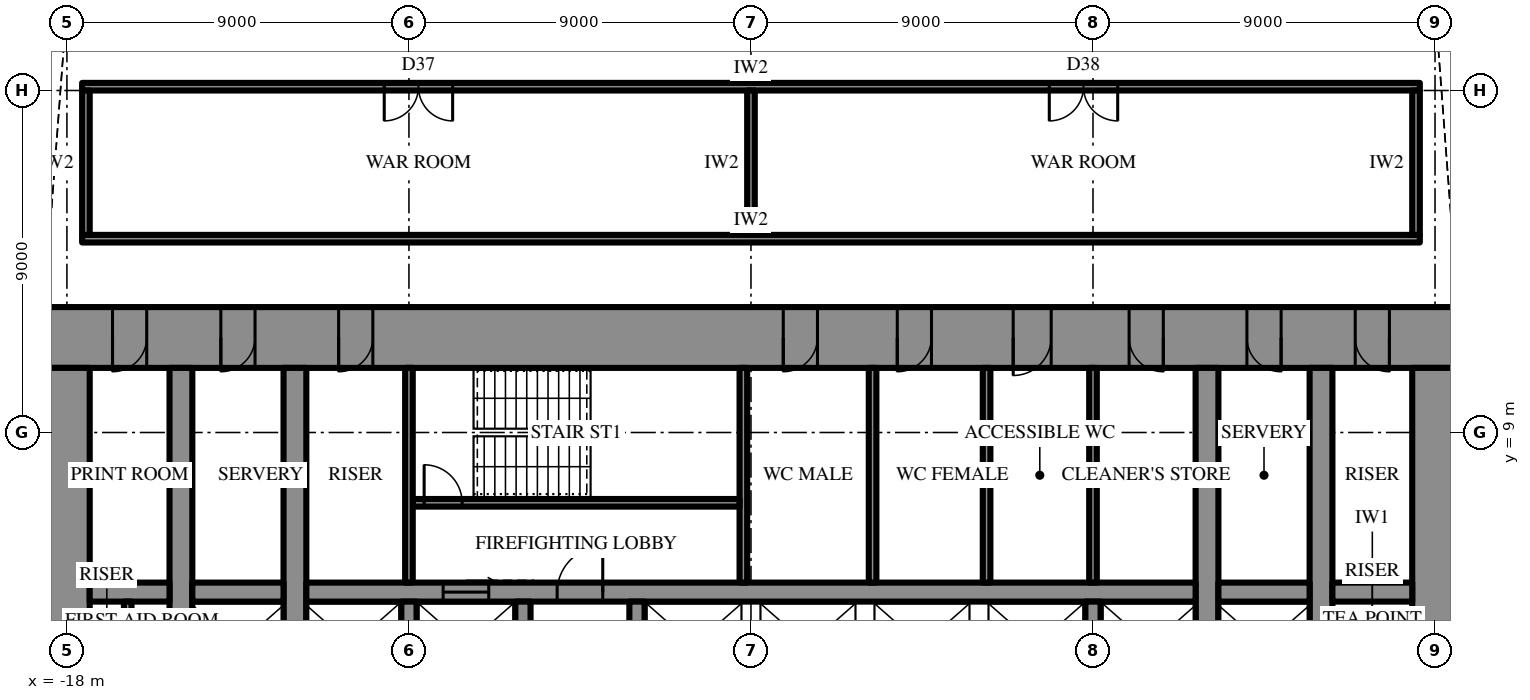
"""IFC4 building model, lengths in metres.
Left out: names, types, materials, properties, quantities, classifications, styles, units other than length and angle.
Written with IfcOpenShell. Run it as: python <this file> out.ifc"""

import sys

from ifc_helpers import new_model, si_unit, direction, frame, frame_2d, origin, place, context, subcontext, project, spatial, rectangle, extrude, element, fill, save


model = new_model("IFC4")
c1 = context("Model", 3, precision=1e-05, world=origin(), true_north=direction((0.0, 1.0)))
c2 = subcontext(c1, "Body", "Model", "MODEL_VIEW")
j1 = project(units=[si_unit("LENGTHUNIT", "METRE"), si_unit("PLANEANGLEUNIT", "RADIAN")], contexts=[c1])
p1 = place(None, origin())
s1 = spatial("IfcSite", under=j1, at=p1, CompositionType="ELEMENT")
p2 = place(p1, origin())
s2 = spatial("IfcBuilding", under=s1, at=p2, CompositionType="ELEMENT")
p3 = place(p2, frame((0.0, 0.0, 153.1)))
s3 = spatial("IfcBuildingStorey", under=s2, at=p3, CompositionType="ELEMENT", Elevation=153.1)
p4 = place(p3, frame((-18.6, 11.5, 0.0), z_axis=(0.0, 0.0, 1.0), x_axis=(1.0, 0.0, 0.0)))
e1 = element("IfcWall", 1, at=p4, inside=s3, PredefinedType="SHEAR", context=c2, shape_type="SweptSolid", body=[
    extrude(rectangle(XDim=37.2, YDim=1.6, at=frame_2d((18.6, 0.0))), origin(), (0.0, 0.0, 1.0), 4.2),
])
p5 = place(p4, frame((19.45, 0.0, 0.0)))
e2 = element("IfcOpeningElement", 2, at=p5, cuts=e1, PredefinedType="OPENING", context=c2, shape_type="SweptSolid", body=[
    extrude(rectangle(XDim=0.9, YDim=2.2, at=frame_2d((0.45, 1.1))), frame((0.0, 0.81, 0.0), z_axis=(0.0, -1.0, 0.0), x_axis=(1.0, 0.0, 0.0)), (0.0, 0.0, 1.0), 1.62),
])
p6 = place(p4, frame((22.45, 0.0, 0.0)))
e3 = element("IfcOpeningElement", 3, at=p6, cuts=e1, PredefinedType="OPENING", context=c2, shape_type="SweptSolid", body=[
    extrude(rectangle(XDim=0.9, YDim=2.2, at=frame_2d((0.45, 1.1))), frame((0.0, 0.81, 0.0), z_axis=(0.0, -1.0, 0.0), x_axis=(1.0, 0.0, 0.0)), (0.0, 0.0, 1.0), 1.62),
])
p7 = place(p4, frame((25.5, 0.0, 0.0)))
e4 = element("IfcOpeningElement", 4, at=p7, cuts=e1, PredefinedType="OPENING", context=c2, shape_type="SweptSolid", body=[
    extrude(rectangle(XDim=1.0, YDim=2.2, at=frame_2d((0.5, 1.1))), frame((0.0, 0.81, 0.0), z_axis=(0.0, -1.0, 0.0), x_axis=(1.0, 0.0, 0.0)), (0.0, 0.0, 1.0), 1.62),
])
p8 = place(p4, frame((1.8, 0.0, 0.0)))
e5 = element("IfcOpeningElement", 5, at=p8, cuts=e1, PredefinedType="OPENING", context=c2, shape_type="SweptSolid", body=[
    extrude(rectangle(XDim=0.9, YDim=2.2, at=frame_2d((0.45, 1.1))), frame((0.0, 0.81, 0.0), z_axis=(0.0, -1.0, 0.0), x_axis=(1.0, 0.0, 0.0)), (0.0, 0.0, 1.0), 1.62),
])
p9 = place(p4, frame((4.65, 0.0, 0.0)))
e6 = element("IfcOpeningElement", 6, at=p9, cuts=e1, PredefinedType="OPENING", context=c2, shape_type="SweptSolid", body=[
    extrude(rectangle(XDim=0.9, YDim=2.2, at=frame_2d((0.45, 1.1))), frame((0.0, 0.81, 0.0), z_axis=(0.0, -1.0, 0.0), x_axis=(1.0, 0.0, 0.0)), (0.0, 0.0, 1.0), 1.62),
])
p10 = place(p4, frame((7.75, 0.0, 0.0)))
e7 = element("IfcOpeningElement", 7, at=p10, cuts=e1, PredefinedType="OPENING", context=c2, shape_type="SweptSolid", body=[
    extrude(rectangle(XDim=0.9, YDim=2.2, at=frame_2d((0.45, 1.1))), frame((0.0, 0.81, 0.0), z_axis=(0.0, -1.0, 0.0), x_axis=(1.0, 0.0, 0.0)), (0.0, 0.0, 1.0), 1.62),
])
p11 = place(p4, frame((28.55, 0.0, 0.0)))
e8 = element("IfcOpeningElement", 8, at=p11, cuts=e1, PredefinedType="OPENING", context=c2, shape_type="SweptSolid", body=[
    extrude(rectangle(XDim=0.9, YDim=2.2, at=frame_2d((0.45, 1.1))), frame((0.0, 0.81, 0.0), z_axis=(0.0, -1.0, 0.0), x_axis=(1.0, 0.0, 0.0)), (0.0, 0.0, 1.0), 1.62),
])
p12 = place(p4, frame((31.65, 0.0, 0.0)))
e9 = element("IfcOpeningElement", 9, at=p12, cuts=e1, PredefinedType="OPENING", context=c2, shape_type="SweptSolid", body=[
    extrude(rectangle(XDim=0.9, YDim=2.2, at=frame_2d((0.45, 1.1))), frame((0.0, 0.81, 0.0), z_axis=(0.0, -1.0, 0.0), x_axis=(1.0, 0.0, 0.0)), (0.0, 0.0, 1.0), 1.62),
])
p13 = place(p4, frame((34.5, 0.0, 0.0)))
e10 = element("IfcOpeningElement", 10, at=p13, cuts=e1, PredefinedType="OPENING", context=c2, shape_type="SweptSolid", body=[
    extrude(rectangle(XDim=0.9, YDim=2.2, at=frame_2d((0.45, 1.1))), frame((0.0, 0.81, 0.0), z_axis=(0.0, -1.0, 0.0), x_axis=(1.0, 0.0, 0.0)), (0.0, 0.0, 1.0), 1.62),
])
p14 = place(p3, frame((18.0, -10.7, 0.0), z_axis=(0.0, 0.0, 1.0), x_axis=(0.0, 1.0, 0.0)))
e11 = element("IfcWall", 11, at=p14, inside=s3, PredefinedType="SHEAR", context=c2, shape_type="SweptSolid", body=[
    extrude(rectangle(XDim=21.4, YDim=1.2, at=frame_2d((10.7, 0.0))), origin(), (0.0, 0.0, 1.0), 4.2),
])
p15 = place(p14, frame((9.8, 0.0, 0.0)))
e12 = element("IfcOpeningElement", 12, at=p15, cuts=e11, PredefinedType="OPENING", context=c2, shape_type="SweptSolid", body=[
    extrude(rectangle(XDim=1.8, YDim=2.4, at=frame_2d((0.9, 1.2))), frame((0.0, 0.61, 0.0), z_axis=(0.0, -1.0, 0.0), x_axis=(1.0, 0.0, 0.0)), (0.0, 0.0, 1.0), 1.22),
])
p16 = place(p3, frame((-18.0, 10.7, 0.0), z_axis=(0.0, 0.0, 1.0), x_axis=(0.0, -1.0, 0.0)))
e13 = element("IfcWall", 13, at=p16, inside=s3, PredefinedType="SHEAR", context=c2, shape_type="SweptSolid", body=[
    extrude(rectangle(XDim=21.4, YDim=1.2, at=frame_2d((10.7, 0.0))), origin(), (0.0, 0.0, 1.0), 4.2),
])
p17 = place(p16, frame((9.8, 0.0, 0.0)))
e14 = element("IfcOpeningElement", 14, at=p17, cuts=e13, PredefinedType="OPENING", context=c2, shape_type="SweptSolid", body=[
    extrude(rectangle(XDim=1.8, YDim=2.4, at=frame_2d((0.9, 1.2))), frame((0.0, 0.61, 0.0), z_axis=(0.0, -1.0, 0.0), x_axis=(1.0, 0.0, 0.0)), (0.0, 0.0, 1.0), 1.22),
])
p18 = place(p3, frame((12.0, -10.7, 0.0), z_axis=(0.0, 0.0, 1.0), x_axis=(0.0, 1.0, 0.0)))
e15 = element("IfcWall", 15, at=p18, inside=s3, PredefinedType="SHEAR", context=c2, shape_type="SweptSolid", body=[
    extrude(rectangle(XDim=21.4, YDim=0.6, at=frame_2d((10.7, 0.0))), origin(), (0.0, 0.0, 1.0), 4.2),
])
p19 = place(p18, frame((9.8, 0.0, 0.0)))
e16 = element("IfcOpeningElement", 16, at=p19, cuts=e15, PredefinedType="OPENING", context=c2, shape_type="SweptSolid", body=[
    extrude(rectangle(XDim=1.8, YDim=2.4, at=frame_2d((0.9, 1.2))), frame((0.0, 0.31, 0.0), z_axis=(0.0, -1.0, 0.0), x_axis=(1.0, 0.0, 0.0)), (0.0, 0.0, 1.0), 0.62),
])
p20 = place(p3, frame((-12.0, -10.7, 0.0), z_axis=(0.0, 0.0, 1.0), x_axis=(0.0, 1.0, 0.0)))
e17 = element("IfcWall", 17, at=p20, inside=s3, PredefinedType="SHEAR", context=c2, shape_type="SweptSolid", body=[
    extrude(rectangle(XDim=21.4, YDim=0.6, at=frame_2d((10.7, 0.0))), origin(), (0.0, 0.0, 1.0), 4.2),
])
p21 = place(p20, frame((9.8, 0.0, 0.0)))
e18 = element("IfcOpeningElement", 18, at=p21, cuts=e17, PredefinedType="OPENING", context=c2, shape_type="SweptSolid", body=[
    extrude(rectangle(XDim=1.8, YDim=2.4, at=frame_2d((0.9, 1.2))), frame((0.0, 0.31, 0.0), z_axis=(0.0, -1.0, 0.0), x_axis=(1.0, 0.0, 0.0)), (0.0, 0.0, 1.0), 0.62),
])
p22 = place(p3, frame((15.0, -10.7, 0.0), z_axis=(0.0, 0.0, 1.0), x_axis=(0.0, 1.0, 0.0)))
e19 = element("IfcWall", 19, at=p22, inside=s3, PredefinedType="SHEAR", context=c2, shape_type="SweptSolid", body=[
    extrude(rectangle(XDim=21.4, YDim=0.6, at=frame_2d((10.7, 0.0))), origin(), (0.0, 0.0, 1.0), 4.2),
])
p23 = place(p22, frame((9.8, 0.0, 0.0)))
e20 = element("IfcOpeningElement", 20, at=p23, cuts=e19, PredefinedType="OPENING", context=c2, shape_type="SweptSolid", body=[
    extrude(rectangle(XDim=1.8, YDim=2.4, at=frame_2d((0.9, 1.2))), frame((0.0, 0.31, 0.0), z_axis=(0.0, -1.0, 0.0), x_axis=(1.0, 0.0, 0.0)), (0.0, 0.0, 1.0), 0.62),
])
p24 = place(p3, frame((-15.0, -10.7, 0.0), z_axis=(0.0, 0.0, 1.0), x_axis=(0.0, 1.0, 0.0)))
e21 = element("IfcWall", 21, at=p24, inside=s3, PredefinedType="SHEAR", context=c2, shape_type="SweptSolid", body=[
    extrude(rectangle(XDim=21.4, YDim=0.6, at=frame_2d((10.7, 0.0))), origin(), (0.0, 0.0, 1.0), 4.2),
])
p25 = place(p24, frame((9.8, 0.0, 0.0)))
e22 = element("IfcOpeningElement", 22, at=p25, cuts=e21, PredefinedType="OPENING", context=c2, shape_type="SweptSolid", body=[
    extrude(rectangle(XDim=1.8, YDim=2.4, at=frame_2d((0.9, 1.2))), frame((0.0, 0.31, 0.0), z_axis=(0.0, -1.0, 0.0), x_axis=(1.0, 0.0, 0.0)), (0.0, 0.0, 1.0), 0.62),
])
p26 = place(p3, frame((-17.4, 4.8, 0.0), z_axis=(0.0, 0.0, 1.0), x_axis=(1.0, 0.0, 0.0)))
e23 = element("IfcWall", 23, at=p26, inside=s3, PredefinedType="SHEAR", context=c2, shape_type="SweptSolid", body=[
    extrude(rectangle(XDim=2.1, YDim=0.5, at=frame_2d((1.05, 0.0))), origin(), (0.0, 0.0, 1.0), 4.2),
])
p27 = place(p3, frame((-14.7, 4.8, 0.0), z_axis=(0.0, 0.0, 1.0), x_axis=(1.0, 0.0, 0.0)))
e24 = element("IfcWall", 24, at=p27, inside=s3, PredefinedType="SHEAR", context=c2, shape_type="SweptSolid", body=[
    extrude(rectangle(XDim=2.4, YDim=0.5, at=frame_2d((1.2, 0.0))), origin(), (0.0, 0.0, 1.0), 4.2),
])
p28 = place(p3, frame((-11.7, 4.8, 0.0), z_axis=(0.0, 0.0, 1.0), x_axis=(1.0, 0.0, 0.0)))
e25 = element("IfcWall", 25, at=p28, inside=s3, PredefinedType="SHEAR", context=c2, shape_type="SweptSolid", body=[
    extrude(rectangle(XDim=23.4, YDim=0.5, at=frame_2d((11.7, 0.0))), origin(), (0.0, 0.0, 1.0), 4.2),
])
p29 = place(p28, frame((6.6, 0.0, 0.0)))
e26 = element("IfcOpeningElement", 26, at=p29, cuts=e25, PredefinedType="OPENING", context=c2, shape_type="SweptSolid", body=[
    extrude(rectangle(XDim=1.2, YDim=2.2, at=frame_2d((0.6, 1.1))), frame((0.0, 0.26, 0.0), z_axis=(0.0, -1.0, 0.0), x_axis=(1.0, 0.0, 0.0)), (0.0, 0.0, 1.0), 0.52),
])
p30 = place(p28, frame((3.6, 0.0, 0.0)))
e27 = element("IfcOpeningElement", 27, at=p30, cuts=e25, PredefinedType="OPENING", context=c2, shape_type="SweptSolid", body=[
    extrude(rectangle(XDim=1.2, YDim=2.2, at=frame_2d((0.6, 1.1))), frame((0.0, 0.26, 0.0), z_axis=(0.0, -1.0, 0.0), x_axis=(1.0, 0.0, 0.0)), (0.0, 0.0, 1.0), 0.52),
])
p31 = place(p3, frame((12.3, 4.8, 0.0), z_axis=(0.0, 0.0, 1.0), x_axis=(1.0, 0.0, 0.0)))
e28 = element("IfcWall", 28, at=p31, inside=s3, PredefinedType="SHEAR", context=c2, shape_type="SweptSolid", body=[
    extrude(rectangle(XDim=2.4, YDim=0.5, at=frame_2d((1.2, 0.0))), origin(), (0.0, 0.0, 1.0), 4.2),
])
p32 = place(p3, frame((15.3, 4.8, 0.0), z_axis=(0.0, 0.0, 1.0), x_axis=(1.0, 0.0, 0.0)))
e29 = element("IfcWall", 29, at=p32, inside=s3, PredefinedType="SHEAR", context=c2, shape_type="SweptSolid", body=[
    extrude(rectangle(XDim=2.1, YDim=0.5, at=frame_2d((1.05, 0.0))), origin(), (0.0, 0.0, 1.0), 4.2),
])
for number, where, z_axis, x_axis in (
    (30, (-9.0, 2.25, 0.0), (0.0, 0.0, 1.0), (0.0, 1.0, 0.0)),
    (31, (-6.0, 2.25, 0.0), (0.0, 0.0, 1.0), (0.0, 1.0, 0.0)),
    (32, (-3.0, 2.25, 0.0), (0.0, 0.0, 1.0), (0.0, 1.0, 0.0)),
    (33, (9.0, 2.25, 0.0), (0.0, 0.0, 1.0), (0.0, 1.0, 0.0)),
):
    element("IfcWall", number, at=place(p3, frame(where, z_axis=z_axis, x_axis=x_axis)), inside=s3, PredefinedType="SHEAR", context=c2, shape_type="SweptSolid", body=[
        extrude(rectangle(XDim=2.3, YDim=0.4, at=frame_2d((1.15, 0.0))), origin(), (0.0, 0.0, 1.0), 4.2),
    ])
p33 = place(p3, frame((-0.2, 5.05, 0.0), z_axis=(0.0, 0.0, 1.0), x_axis=(0.0, 1.0, 0.0)))
e34 = element("IfcWall", 34, at=p33, inside=s3, PredefinedType="SHEAR", context=c2, shape_type="SweptSolid", body=[
    extrude(rectangle(XDim=5.65, YDim=0.2, at=frame_2d((2.825, 0.0))), origin(), (0.0, 0.0, 1.0), 4.2),
])
p34 = place(p3, frame((-8.9, 7.15, 0.0), z_axis=(0.0, 0.0, 1.0), x_axis=(1.0, 0.0, 0.0)))
e35 = element("IfcWall", 35, at=p34, inside=s3, PredefinedType="SHEAR", context=c2, shape_type="SweptSolid", body=[
    extrude(rectangle(XDim=8.6, YDim=0.2, at=frame_2d((4.3, 0.0))), origin(), (0.0, 0.0, 1.0), 4.2),
])
p35 = place(p34, frame((0.3, 0.0, 0.0)))
e36 = element("IfcOpeningElement", 36, at=p35, cuts=e35, PredefinedType="OPENING", context=c2, shape_type="SweptSolid", body=[
    extrude(rectangle(XDim=1.0, YDim=2.2, at=frame_2d((0.5, 1.1))), frame((0.0, 0.11, 0.0), z_axis=(0.0, -1.0, 0.0), x_axis=(1.0, 0.0, 0.0)), (0.0, 0.0, 1.0), 0.22),
])
for number, where, z_axis, x_axis in (
    (37, (-9.0, 5.05, 0.0), (0.0, 0.0, 1.0), (0.0, 1.0, 0.0)),
    (38, (9.0, 5.05, 0.0), (0.0, 0.0, 1.0), (0.0, 1.0, 0.0)),
    (39, (3.2, 5.05, 0.0), (0.0, 0.0, 1.0), (0.0, 1.0, 0.0)),
    (40, (6.2, 5.05, 0.0), (0.0, 0.0, 1.0), (0.0, 1.0, 0.0)),
):
    element("IfcWall", number, at=place(p3, frame(where, z_axis=z_axis, x_axis=x_axis)), inside=s3, PredefinedType="PARTITIONING", context=c2, shape_type="SweptSolid", body=[
        extrude(rectangle(XDim=5.65, YDim=0.2, at=frame_2d((2.825, 0.0))), origin(), (0.0, 0.0, 1.0), 4.0),
    ])
p36 = place(p3, frame((-16.4, 3.55, 0.0), z_axis=(0.0, 0.0, 1.0), x_axis=(0.0, 1.0, 0.0)))
e41 = element("IfcWall", 41, at=p36, inside=s3, PredefinedType="PARTITIONING", context=c2, shape_type="SweptSolid", body=[
    extrude(rectangle(XDim=1.0, YDim=0.2, at=frame_2d((0.5, 0.0))), origin(), (0.0, 0.0, 1.0), 4.0),
])
p37 = place(p3, frame((-17.6, 14.1, 0.0), z_axis=(0.0, 0.0, 1.0), x_axis=(1.0, 0.0, 0.0)))
e42 = element("IfcWall", 42, at=p37, inside=s3, PredefinedType="PARTITIONING", context=c2, shape_type="SweptSolid", body=[
    extrude(rectangle(XDim=35.2, YDim=0.2, at=frame_2d((17.6, 0.0))), origin(), (0.0, 0.0, 1.0), 4.0),
])
p38 = place(p3, frame((-17.6, 18.1, 0.0), z_axis=(0.0, 0.0, 1.0), x_axis=(1.0, 0.0, 0.0)))
e43 = element("IfcWall", 43, at=p38, inside=s3, PredefinedType="PARTITIONING", context=c2, shape_type="SweptSolid", body=[
    extrude(rectangle(XDim=35.2, YDim=0.2, at=frame_2d((17.6, 0.0))), origin(), (0.0, 0.0, 1.0), 4.0),
])
p39 = place(p38, frame((7.95, 0.0, 0.0)))
e44 = element("IfcOpeningElement", 44, at=p39, cuts=e43, PredefinedType="OPENING", context=c2, shape_type="SweptSolid", body=[
    extrude(rectangle(XDim=1.8, YDim=2.4, at=frame_2d((0.9, 1.2))), frame((0.0, 0.11, 0.0), z_axis=(0.0, -1.0, 0.0), x_axis=(1.0, 0.0, 0.0)), (0.0, 0.0, 1.0), 0.22),
])
p40 = place(p38, frame((25.45, 0.0, 0.0)))
e45 = element("IfcOpeningElement", 45, at=p40, cuts=e43, PredefinedType="OPENING", context=c2, shape_type="SweptSolid", body=[
    extrude(rectangle(XDim=1.8, YDim=2.4, at=frame_2d((0.9, 1.2))), frame((0.0, 0.11, 0.0), z_axis=(0.0, -1.0, 0.0), x_axis=(1.0, 0.0, 0.0)), (0.0, 0.0, 1.0), 0.22),
])
p41 = place(p3, frame((-17.5, 14.2, 0.0), z_axis=(0.0, 0.0, 1.0), x_axis=(0.0, 1.0, 0.0)))
e46 = element("IfcWall", 46, at=p41, inside=s3, PredefinedType="PARTITIONING", context=c2, shape_type="SweptSolid", body=[
    extrude(rectangle(XDim=3.8, YDim=0.2, at=frame_2d((1.9, 0.0))), origin(), (0.0, 0.0, 1.0), 4.0),
])
p42 = place(p3, frame((0.0, 14.2, 0.0), z_axis=(0.0, 0.0, 1.0), x_axis=(0.0, 1.0, 0.0)))
e47 = element("IfcWall", 47, at=p42, inside=s3, PredefinedType="PARTITIONING", context=c2, shape_type="SweptSolid", body=[
    extrude(rectangle(XDim=3.8, YDim=0.2, at=frame_2d((1.9, 0.0))), origin(), (0.0, 0.0, 1.0), 2.992),
])
p43 = place(p3, frame((17.5, 14.2, 0.0), z_axis=(0.0, 0.0, 1.0), x_axis=(0.0, 1.0, 0.0)))
e48 = element("IfcWall", 48, at=p43, inside=s3, PredefinedType="PARTITIONING", context=c2, shape_type="SweptSolid", body=[
    extrude(rectangle(XDim=3.8, YDim=0.2, at=frame_2d((1.9, 0.0))), origin(), (0.0, 0.0, 1.0), 4.0),
])
p44 = place(p29, origin())
e49 = element("IfcDoor", 49, at=p44, inside=s3, OperationType="SINGLE_SWING_LEFT", PredefinedType="DOOR", context=c2, shape_type="SweptSolid", body=[
    extrude(rectangle(XDim=1.2, YDim=2.2, at=frame_2d((0.6, 1.1))), frame((0.0, 0.025, 0.0), z_axis=(0.0, -1.0, 0.0), x_axis=(1.0, 0.0, 0.0)), (0.0, 0.0, 1.0), 0.05),
])
fill(e26, e49)
p45 = place(p35, origin())
e50 = element("IfcDoor", 50, at=p45, inside=s3, OperationType="SINGLE_SWING_RIGHT", PredefinedType="DOOR", context=c2, shape_type="SweptSolid", body=[
    extrude(rectangle(XDim=1.0, YDim=2.2, at=frame_2d((0.5, 1.1))), frame((0.0, 0.025, 0.0), z_axis=(0.0, -1.0, 0.0), x_axis=(1.0, 0.0, 0.0)), (0.0, 0.0, 1.0), 0.05),
])
fill(e36, e50)
p46 = place(p5, frame((0.9, 0.0, 0.0), z_axis=(0.0, 0.0, 1.0), x_axis=(-1.0, 0.0, 0.0)))
e51 = element("IfcDoor", 51, at=p46, inside=s3, OperationType="SINGLE_SWING_LEFT", PredefinedType="DOOR", context=c2, shape_type="SweptSolid", body=[
    extrude(rectangle(XDim=0.9, YDim=2.2, at=frame_2d((0.45, 1.1))), frame((0.0, 0.025, 0.0), z_axis=(0.0, -1.0, 0.0), x_axis=(1.0, 0.0, 0.0)), (0.0, 0.0, 1.0), 0.05),
])
fill(e2, e51)
p47 = place(p6, frame((0.9, 0.0, 0.0), z_axis=(0.0, 0.0, 1.0), x_axis=(-1.0, 0.0, 0.0)))
e52 = element("IfcDoor", 52, at=p47, inside=s3, OperationType="SINGLE_SWING_LEFT", PredefinedType="DOOR", context=c2, shape_type="SweptSolid", body=[
    extrude(rectangle(XDim=0.9, YDim=2.2, at=frame_2d((0.45, 1.1))), frame((0.0, 0.025, 0.0), z_axis=(0.0, -1.0, 0.0), x_axis=(1.0, 0.0, 0.0)), (0.0, 0.0, 1.0), 0.05),
])
fill(e3, e52)
p48 = place(p7, frame((1.0, 0.0, 0.0), z_axis=(0.0, 0.0, 1.0), x_axis=(-1.0, 0.0, 0.0)))
e53 = element("IfcDoor", 53, at=p48, inside=s3, OperationType="SINGLE_SWING_LEFT", PredefinedType="DOOR", context=c2, shape_type="SweptSolid", body=[
    extrude(rectangle(XDim=1.0, YDim=2.2, at=frame_2d((0.5, 1.1))), frame((0.0, 0.025, 0.0), z_axis=(0.0, -1.0, 0.0), x_axis=(1.0, 0.0, 0.0)), (0.0, 0.0, 1.0), 0.05),
])
fill(e4, e53)
p49 = place(p8, frame((0.9, 0.0, 0.0), z_axis=(0.0, 0.0, 1.0), x_axis=(-1.0, 0.0, 0.0)))
e54 = element("IfcDoor", 54, at=p49, inside=s3, OperationType="SINGLE_SWING_LEFT", PredefinedType="DOOR", context=c2, shape_type="SweptSolid", body=[
    extrude(rectangle(XDim=0.9, YDim=2.2, at=frame_2d((0.45, 1.1))), frame((0.0, 0.025, 0.0), z_axis=(0.0, -1.0, 0.0), x_axis=(1.0, 0.0, 0.0)), (0.0, 0.0, 1.0), 0.05),
])
fill(e5, e54)
p50 = place(p9, frame((0.9, 0.0, 0.0), z_axis=(0.0, 0.0, 1.0), x_axis=(-1.0, 0.0, 0.0)))
e55 = element("IfcDoor", 55, at=p50, inside=s3, OperationType="SINGLE_SWING_LEFT", PredefinedType="DOOR", context=c2, shape_type="SweptSolid", body=[
    extrude(rectangle(XDim=0.9, YDim=2.2, at=frame_2d((0.45, 1.1))), frame((0.0, 0.025, 0.0), z_axis=(0.0, -1.0, 0.0), x_axis=(1.0, 0.0, 0.0)), (0.0, 0.0, 1.0), 0.05),
])
fill(e6, e55)
p51 = place(p10, frame((0.9, 0.0, 0.0), z_axis=(0.0, 0.0, 1.0), x_axis=(-1.0, 0.0, 0.0)))
e56 = element("IfcDoor", 56, at=p51, inside=s3, OperationType="SINGLE_SWING_LEFT", PredefinedType="DOOR", context=c2, shape_type="SweptSolid", body=[
    extrude(rectangle(XDim=0.9, YDim=2.2, at=frame_2d((0.45, 1.1))), frame((0.0, 0.025, 0.0), z_axis=(0.0, -1.0, 0.0), x_axis=(1.0, 0.0, 0.0)), (0.0, 0.0, 1.0), 0.05),
])
fill(e7, e56)
p52 = place(p11, frame((0.9, 0.0, 0.0), z_axis=(0.0, 0.0, 1.0), x_axis=(-1.0, 0.0, 0.0)))
e57 = element("IfcDoor", 57, at=p52, inside=s3, OperationType="SINGLE_SWING_RIGHT", PredefinedType="DOOR", context=c2, shape_type="SweptSolid", body=[
    extrude(rectangle(XDim=0.9, YDim=2.2, at=frame_2d((0.45, 1.1))), frame((0.0, 0.025, 0.0), z_axis=(0.0, -1.0, 0.0), x_axis=(1.0, 0.0, 0.0)), (0.0, 0.0, 1.0), 0.05),
])
fill(e8, e57)
p53 = place(p12, frame((0.9, 0.0, 0.0), z_axis=(0.0, 0.0, 1.0), x_axis=(-1.0, 0.0, 0.0)))
e58 = element("IfcDoor", 58, at=p53, inside=s3, OperationType="SINGLE_SWING_RIGHT", PredefinedType="DOOR", context=c2, shape_type="SweptSolid", body=[
    extrude(rectangle(XDim=0.9, YDim=2.2, at=frame_2d((0.45, 1.1))), frame((0.0, 0.025, 0.0), z_axis=(0.0, -1.0, 0.0), x_axis=(1.0, 0.0, 0.0)), (0.0, 0.0, 1.0), 0.05),
])
fill(e9, e58)
p54 = place(p13, frame((0.9, 0.0, 0.0), z_axis=(0.0, 0.0, 1.0), x_axis=(-1.0, 0.0, 0.0)))
e59 = element("IfcDoor", 59, at=p54, inside=s3, OperationType="SINGLE_SWING_RIGHT", PredefinedType="DOOR", context=c2, shape_type="SweptSolid", body=[
    extrude(rectangle(XDim=0.9, YDim=2.2, at=frame_2d((0.45, 1.1))), frame((0.0, 0.025, 0.0), z_axis=(0.0, -1.0, 0.0), x_axis=(1.0, 0.0, 0.0)), (0.0, 0.0, 1.0), 0.05),
])
fill(e10, e59)
p55 = place(p30, origin())
e60 = element("IfcDoor", 60, at=p55, inside=s3, OperationType="SLIDING_TO_LEFT", PredefinedType="DOOR", context=c2, shape_type="SweptSolid", body=[
    extrude(rectangle(XDim=1.2, YDim=2.2, at=frame_2d((0.6, 1.1))), frame((0.0, 0.025, 0.0), z_axis=(0.0, -1.0, 0.0), x_axis=(1.0, 0.0, 0.0)), (0.0, 0.0, 1.0), 0.05),
])
fill(e27, e60)
p56 = place(p39, frame((1.8, 0.0, 0.0), z_axis=(0.0, 0.0, 1.0), x_axis=(-1.0, 0.0, 0.0)))
e61 = element("IfcDoor", 61, at=p56, inside=s3, OperationType="DOUBLE_DOOR_SINGLE_SWING", PredefinedType="DOOR", context=c2, shape_type="SweptSolid", body=[
    extrude(rectangle(XDim=1.8, YDim=2.4, at=frame_2d((0.9, 1.2))), frame((0.0, 0.025, 0.0), z_axis=(0.0, -1.0, 0.0), x_axis=(1.0, 0.0, 0.0)), (0.0, 0.0, 1.0), 0.05),
])
fill(e44, e61)
p57 = place(p40, frame((1.8, 0.0, 0.0), z_axis=(0.0, 0.0, 1.0), x_axis=(-1.0, 0.0, 0.0)))
e62 = element("IfcDoor", 62, at=p57, inside=s3, OperationType="DOUBLE_DOOR_SINGLE_SWING", PredefinedType="DOOR", context=c2, shape_type="SweptSolid", body=[
    extrude(rectangle(XDim=1.8, YDim=2.4, at=frame_2d((0.9, 1.2))), frame((0.0, 0.025, 0.0), z_axis=(0.0, -1.0, 0.0), x_axis=(1.0, 0.0, 0.0)), (0.0, 0.0, 1.0), 0.05),
])
fill(e45, e62)
save(model, sys.argv[1])
